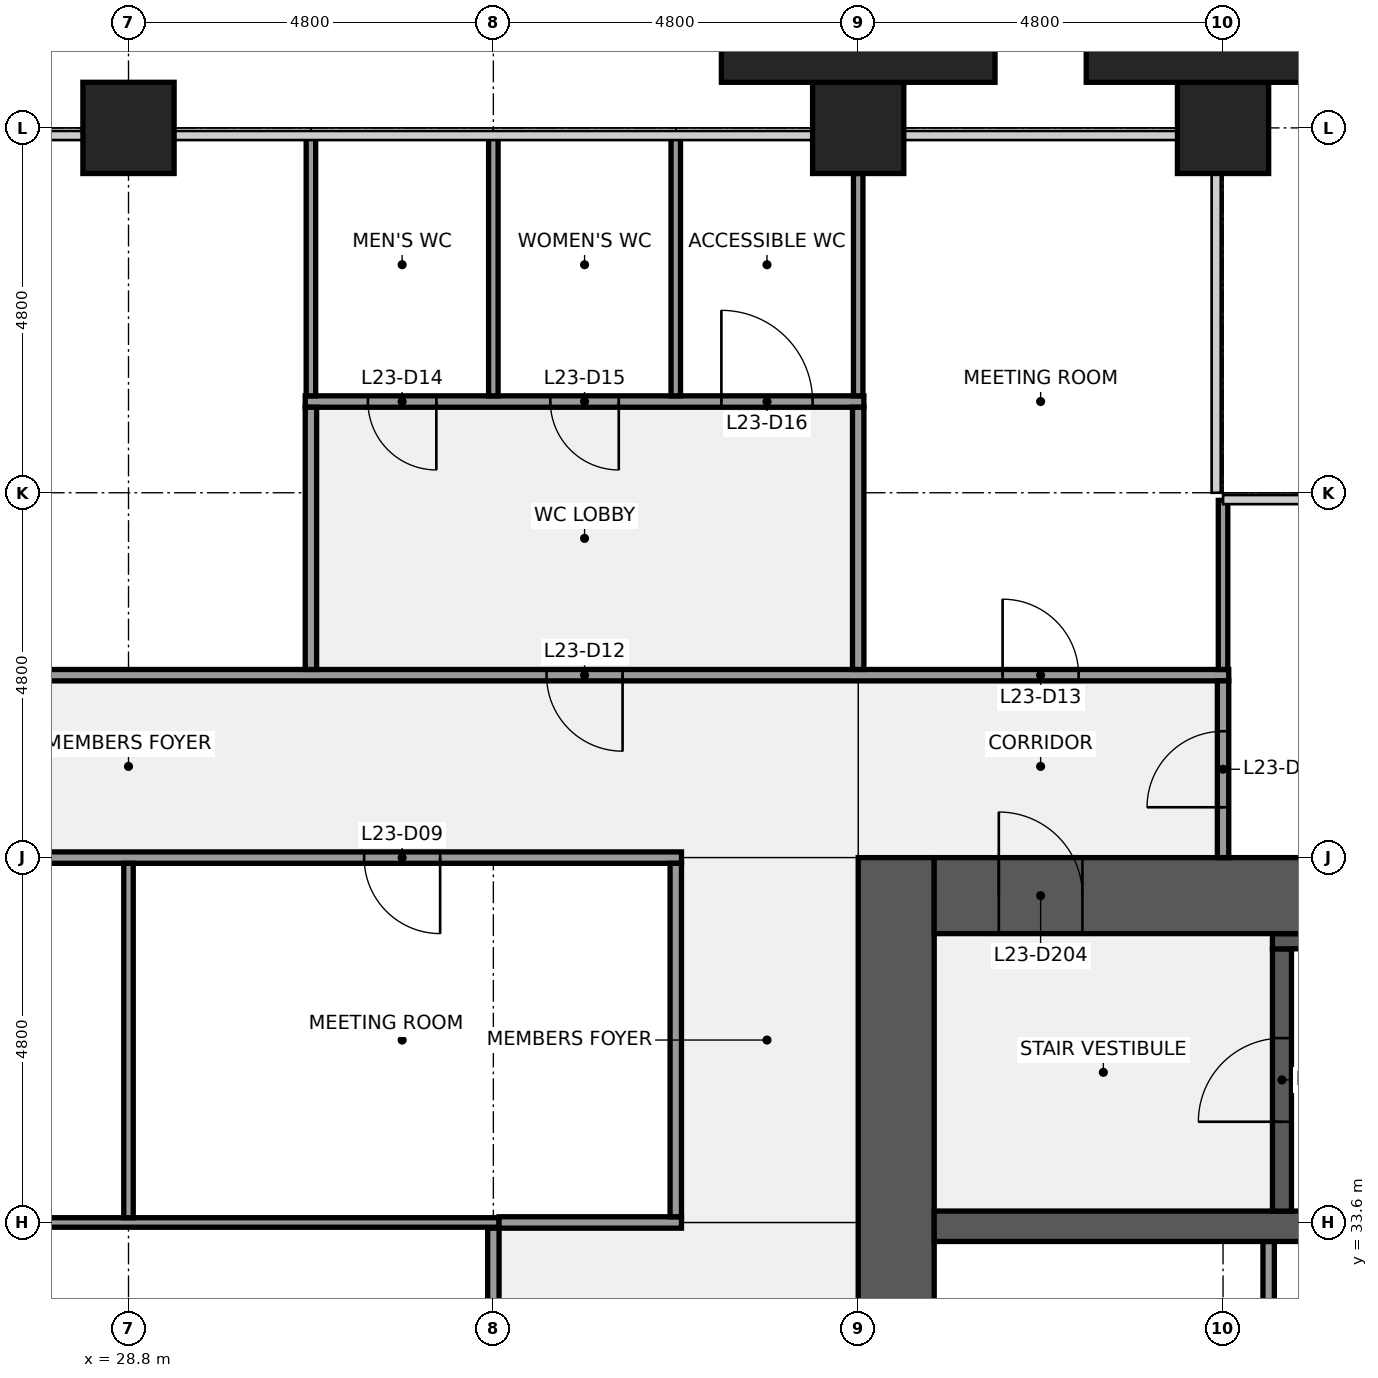
"""IFC4 building model, lengths in metres.
Left out: names, types, materials, properties, quantities, classifications, styles, units other than length and angle.
Written with IfcOpenShell. Run it as: python <this file> out.ifc"""

import sys

from ifc_helpers import new_model, si_unit, direction, frame, frame_2d, origin, origin_2d, place, context, subcontext, project, spatial, rectangle, extrude, element, fill, save


model = new_model("IFC4")
c1 = context("Model", 3, precision=1e-05, world=origin(), true_north=direction((0.0, 1.0)))
c2 = subcontext(c1, "Body", "Model", "MODEL_VIEW")
j1 = project(units=[si_unit("LENGTHUNIT", "METRE"), si_unit("PLANEANGLEUNIT", "RADIAN")], contexts=[c1])
p1 = place(None, origin())
s1 = spatial("IfcSite", under=j1, at=p1, CompositionType="ELEMENT")
p2 = place(p1, origin())
s2 = spatial("IfcBuilding", under=s1, at=p2, CompositionType="ELEMENT")
p3 = place(p2, frame((0.0, 0.0, 112.1)))
s3 = spatial("IfcBuildingStorey", under=s2, at=p3, CompositionType="ELEMENT", Elevation=112.1)
for number, where, z_axis, x_axis in (
    (1, (28.8, 48.0, 0.0), (0.0, 0.0, 1.0), (1.0, 0.0, 0.0)),
    (2, (38.4, 48.0, 0.0), (0.0, 0.0, 1.0), (1.0, 0.0, 0.0)),
    (3, (43.2, 48.0, 0.0), (0.0, 0.0, 1.0), (1.0, 0.0, 0.0)),
):
    element("IfcColumn", number, at=place(p3, frame(where, z_axis=z_axis, x_axis=x_axis)), inside=s3, PredefinedType="COLUMN", context=c2, shape_type="SweptSolid", body=[
        extrude(rectangle(XDim=1.2, YDim=1.2, at=origin_2d()), origin(), (0.0, 0.0, 1.0), 4.0),
    ])
p4 = place(p3, frame((38.9, 9.6, 0.0), z_axis=(0.0, 0.0, 1.0), x_axis=(0.0, 1.0, 0.0)))
e4 = element("IfcWall", 4, at=p4, inside=s3, PredefinedType="SHEAR", context=c2, shape_type="SweptSolid", body=[
    extrude(rectangle(XDim=28.8, YDim=1.0, at=frame_2d((14.4, 0.0))), origin(), (0.0, 0.0, 1.0), 3.84),
])
p5 = place(p4, frame((8.7, 0.0, 0.0)))
e5 = element("IfcOpeningElement", 5, at=p5, cuts=e4, PredefinedType="OPENING", context=c2, shape_type="SweptSolid", body=[
    extrude(rectangle(XDim=1.8, YDim=2.1, at=frame_2d((0.9, 1.05))), frame((0.0, 0.51, 0.0), z_axis=(0.0, -1.0, 0.0), x_axis=(1.0, 0.0, 0.0)), (0.0, 0.0, 1.0), 1.02),
])
p6 = place(p4, frame((18.3, 0.0, 0.0)))
e6 = element("IfcOpeningElement", 6, at=p6, cuts=e4, PredefinedType="OPENING", context=c2, shape_type="SweptSolid", body=[
    extrude(rectangle(XDim=1.8, YDim=2.1, at=frame_2d((0.9, 1.05))), frame((0.0, 0.51, 0.0), z_axis=(0.0, -1.0, 0.0), x_axis=(1.0, 0.0, 0.0)), (0.0, 0.0, 1.0), 1.02),
])
p7 = place(p3, frame((43.8, 30.75, 0.0), z_axis=(0.0, 0.0, 1.0), x_axis=(0.0, 1.0, 0.0)))
e7 = element("IfcWall", 7, at=p7, inside=s3, PredefinedType="PARTITIONING", context=c2, shape_type="SweptSolid", body=[
    extrude(rectangle(XDim=2.6, YDim=0.15, at=frame_2d((1.3, 0.0))), origin(), (0.0, 0.0, 1.0), 3.84),
])
p8 = place(p3, frame((39.4, 33.55, 0.0), z_axis=(0.0, 0.0, 1.0), x_axis=(1.0, 0.0, 0.0)))
e8 = element("IfcWall", 8, at=p8, inside=s3, PredefinedType="SHEAR", context=c2, shape_type="SweptSolid", body=[
    extrude(rectangle(XDim=17.2, YDim=0.4, at=frame_2d((8.6, 0.0))), origin(), (0.0, 0.0, 1.0), 3.84),
])
p9 = place(p3, frame((43.975, 33.75, 0.0), z_axis=(0.0, 0.0, 1.0), x_axis=(0.0, 1.0, 0.0)))
e9 = element("IfcWall", 9, at=p9, inside=s3, PredefinedType="SHEAR", context=c2, shape_type="SweptSolid", body=[
    extrude(rectangle(XDim=3.45, YDim=0.25, at=frame_2d((1.725, 0.0))), origin(), (0.0, 0.0, 1.0), 3.84),
])
p10 = place(p9, frame((1.175, 0.0, 0.0)))
e10 = element("IfcOpeningElement", 10, at=p10, cuts=e9, PredefinedType="OPENING", context=c2, shape_type="SweptSolid", body=[
    extrude(rectangle(XDim=1.1, YDim=2.1, at=frame_2d((0.55, 1.05))), frame((0.0, 0.135, 0.0), z_axis=(0.0, -1.0, 0.0), x_axis=(1.0, 0.0, 0.0)), (0.0, 0.0, 1.0), 0.27),
])
p11 = place(p3, frame((43.85, 37.3, 0.0), z_axis=(0.0, 0.0, 1.0), x_axis=(1.0, 0.0, 0.0)))
e11 = element("IfcWall", 11, at=p11, inside=s3, PredefinedType="SHEAR", context=c2, shape_type="SweptSolid", body=[
    extrude(rectangle(XDim=7.5, YDim=0.2, at=frame_2d((3.75, 0.0))), origin(), (0.0, 0.0, 1.0), 3.84),
])
p12 = place(p3, frame((39.4, 37.9, 0.0), z_axis=(0.0, 0.0, 1.0), x_axis=(1.0, 0.0, 0.0)))
e12 = element("IfcWall", 12, at=p12, inside=s3, PredefinedType="SHEAR", context=c2, shape_type="SweptSolid", body=[
    extrude(rectangle(XDim=13.4, YDim=1.0, at=frame_2d((6.7, 0.0))), origin(), (0.0, 0.0, 1.0), 3.84),
])
p13 = place(p12, frame((0.85, 0.0, 0.0)))
e13 = element("IfcOpeningElement", 13, at=p13, cuts=e12, PredefinedType="OPENING", context=c2, shape_type="SweptSolid", body=[
    extrude(rectangle(XDim=1.1, YDim=2.1, at=frame_2d((0.55, 1.05))), frame((0.0, 0.51, 0.0), z_axis=(0.0, -1.0, 0.0), x_axis=(1.0, 0.0, 0.0)), (0.0, 0.0, 1.0), 1.02),
])
p14 = place(p3, frame((24.075, 33.6, 0.0), z_axis=(0.0, 0.0, 1.0), x_axis=(1.0, 0.0, 0.0)))
e14 = element("IfcWall", 14, at=p14, inside=s3, PredefinedType="PARTITIONING", context=c2, shape_type="SweptSolid", body=[
    extrude(rectangle(XDim=9.6, YDim=0.125, at=frame_2d((4.8, 0.0))), origin(), (0.0, 0.0, 1.0), 2.849),
])
p15 = place(p3, frame((33.675, 33.6, 0.0), z_axis=(0.0, 0.0, 1.0), x_axis=(1.0, 0.0, 0.0)))
e15 = element("IfcWall", 15, at=p15, inside=s3, PredefinedType="PARTITIONING", context=c2, shape_type="SweptSolid", body=[
    extrude(rectangle(XDim=2.4, YDim=0.15, at=frame_2d((1.2, 0.0))), origin(), (0.0, 0.0, 1.0), 2.849),
])
p16 = place(p3, frame((21.525, 38.4, 0.0), z_axis=(0.0, 0.0, 1.0), x_axis=(1.0, 0.0, 0.0)))
e16 = element("IfcWall", 16, at=p16, inside=s3, PredefinedType="PARTITIONING", context=c2, shape_type="SweptSolid", body=[
    extrude(rectangle(XDim=14.55, YDim=0.15, at=frame_2d((7.275, 0.0))), origin(), (0.0, 0.0, 1.0), 2.849),
])
p17 = place(p16, frame((3.175, 0.0, 0.0)))
e17 = element("IfcOpeningElement", 17, at=p17, cuts=e16, PredefinedType="OPENING", context=c2, shape_type="SweptSolid", body=[
    extrude(rectangle(XDim=1.0, YDim=2.1, at=frame_2d((0.5, 1.05))), frame((0.0, 0.085, 0.0), z_axis=(0.0, -1.0, 0.0), x_axis=(1.0, 0.0, 0.0)), (0.0, 0.0, 1.0), 0.17),
])
p18 = place(p16, frame((10.375, 0.0, 0.0)))
e18 = element("IfcOpeningElement", 18, at=p18, cuts=e16, PredefinedType="OPENING", context=c2, shape_type="SweptSolid", body=[
    extrude(rectangle(XDim=1.0, YDim=2.1, at=frame_2d((0.5, 1.05))), frame((0.0, 0.085, 0.0), z_axis=(0.0, -1.0, 0.0), x_axis=(1.0, 0.0, 0.0)), (0.0, 0.0, 1.0), 0.17),
])
p19 = place(p3, frame((14.325, 40.8, 0.0), z_axis=(0.0, 0.0, 1.0), x_axis=(1.0, 0.0, 0.0)))
e19 = element("IfcWall", 19, at=p19, inside=s3, PredefinedType="PARTITIONING", context=c2, shape_type="SweptSolid", body=[
    extrude(rectangle(XDim=28.95, YDim=0.15, at=frame_2d((14.475, 0.0))), origin(), (0.0, 0.0, 1.0), 2.849),
])
p20 = place(p19, frame((1.975, 0.0, 0.0)))
e20 = element("IfcOpeningElement", 20, at=p20, cuts=e19, PredefinedType="OPENING", context=c2, shape_type="SweptSolid", body=[
    extrude(rectangle(XDim=1.0, YDim=2.1, at=frame_2d((0.5, 1.05))), frame((0.0, 0.085, 0.0), z_axis=(0.0, -1.0, 0.0), x_axis=(1.0, 0.0, 0.0)), (0.0, 0.0, 1.0), 0.17),
])
p21 = place(p19, frame((10.375, 0.0, 0.0)))
e21 = element("IfcOpeningElement", 21, at=p21, cuts=e19, PredefinedType="OPENING", context=c2, shape_type="SweptSolid", body=[
    extrude(rectangle(XDim=1.0, YDim=2.1, at=frame_2d((0.5, 1.05))), frame((0.0, 0.085, 0.0), z_axis=(0.0, -1.0, 0.0), x_axis=(1.0, 0.0, 0.0)), (0.0, 0.0, 1.0), 0.17),
])
p22 = place(p19, frame((19.975, 0.0, 0.0)))
e22 = element("IfcOpeningElement", 22, at=p22, cuts=e19, PredefinedType="OPENING", context=c2, shape_type="SweptSolid", body=[
    extrude(rectangle(XDim=1.0, YDim=2.1, at=frame_2d((0.5, 1.05))), frame((0.0, 0.085, 0.0), z_axis=(0.0, -1.0, 0.0), x_axis=(1.0, 0.0, 0.0)), (0.0, 0.0, 1.0), 0.17),
])
p23 = place(p19, frame((25.975, 0.0, 0.0)))
e23 = element("IfcOpeningElement", 23, at=p23, cuts=e19, PredefinedType="OPENING", context=c2, shape_type="SweptSolid", body=[
    extrude(rectangle(XDim=1.0, YDim=2.1, at=frame_2d((0.5, 1.05))), frame((0.0, 0.085, 0.0), z_axis=(0.0, -1.0, 0.0), x_axis=(1.0, 0.0, 0.0)), (0.0, 0.0, 1.0), 0.17),
])
p24 = place(p3, frame((31.125, 44.4, 0.0), z_axis=(0.0, 0.0, 1.0), x_axis=(1.0, 0.0, 0.0)))
e24 = element("IfcWall", 24, at=p24, inside=s3, PredefinedType="PARTITIONING", context=c2, shape_type="SweptSolid", body=[
    extrude(rectangle(XDim=7.35, YDim=0.15, at=frame_2d((3.675, 0.0))), origin(), (0.0, 0.0, 1.0), 2.849),
])
p25 = place(p24, frame((0.825, 0.0, 0.0)))
e25 = element("IfcOpeningElement", 25, at=p25, cuts=e24, PredefinedType="OPENING", context=c2, shape_type="SweptSolid", body=[
    extrude(rectangle(XDim=0.9, YDim=2.1, at=frame_2d((0.45, 1.05))), frame((0.0, 0.085, 0.0), z_axis=(0.0, -1.0, 0.0), x_axis=(1.0, 0.0, 0.0)), (0.0, 0.0, 1.0), 0.17),
])
p26 = place(p24, frame((3.225, 0.0, 0.0)))
e26 = element("IfcOpeningElement", 26, at=p26, cuts=e24, PredefinedType="OPENING", context=c2, shape_type="SweptSolid", body=[
    extrude(rectangle(XDim=0.9, YDim=2.1, at=frame_2d((0.45, 1.05))), frame((0.0, 0.085, 0.0), z_axis=(0.0, -1.0, 0.0), x_axis=(1.0, 0.0, 0.0)), (0.0, 0.0, 1.0), 0.17),
])
p27 = place(p24, frame((5.475, 0.0, 0.0)))
e27 = element("IfcOpeningElement", 27, at=p27, cuts=e24, PredefinedType="OPENING", context=c2, shape_type="SweptSolid", body=[
    extrude(rectangle(XDim=1.2, YDim=2.1, at=frame_2d((0.6, 1.05))), frame((0.0, 0.085, 0.0), z_axis=(0.0, -1.0, 0.0), x_axis=(1.0, 0.0, 0.0)), (0.0, 0.0, 1.0), 0.17),
])
p28 = place(p3, frame((28.8, 33.663, 0.0), z_axis=(0.0, 0.0, 1.0), x_axis=(0.0, 1.0, 0.0)))
e28 = element("IfcWall", 28, at=p28, inside=s3, PredefinedType="PARTITIONING", context=c2, shape_type="SweptSolid", body=[
    extrude(rectangle(XDim=4.662, YDim=0.125, at=frame_2d((2.331, 0.0))), origin(), (0.0, 0.0, 1.0), 2.849),
])
p29 = place(p3, frame((31.2, 44.475, 0.0), z_axis=(0.0, 0.0, 1.0), x_axis=(0.0, 1.0, 0.0)))
e29 = element("IfcWall", 29, at=p29, inside=s3, PredefinedType="PARTITIONING", context=c2, shape_type="SweptSolid", body=[
    extrude(rectangle(XDim=3.425, YDim=0.125, at=frame_2d((1.712, 0.0))), origin(), (0.0, 0.0, 1.0), 2.849),
])
p30 = place(p3, frame((31.2, 40.875, 0.0), z_axis=(0.0, 0.0, 1.0), x_axis=(0.0, 1.0, 0.0)))
e30 = element("IfcWall", 30, at=p30, inside=s3, PredefinedType="PARTITIONING", context=c2, shape_type="SweptSolid", body=[
    extrude(rectangle(XDim=3.45, YDim=0.15, at=frame_2d((1.725, 0.0))), origin(), (0.0, 0.0, 1.0), 2.849),
])
p31 = place(p3, frame((33.6, 44.475, 0.0), z_axis=(0.0, 0.0, 1.0), x_axis=(0.0, 1.0, 0.0)))
e31 = element("IfcWall", 31, at=p31, inside=s3, PredefinedType="PARTITIONING", context=c2, shape_type="SweptSolid", body=[
    extrude(rectangle(XDim=3.425, YDim=0.125, at=frame_2d((1.712, 0.0))), origin(), (0.0, 0.0, 1.0), 2.849),
])
p32 = place(p3, frame((33.6, 20.475, 0.0), z_axis=(0.0, 0.0, 1.0), x_axis=(0.0, 1.0, 0.0)))
e32 = element("IfcWall", 32, at=p32, inside=s3, PredefinedType="PARTITIONING", context=c2, shape_type="SweptSolid", body=[
    extrude(rectangle(XDim=13.05, YDim=0.15, at=frame_2d((6.525, 0.0))), origin(), (0.0, 0.0, 1.0), 2.849),
])
p33 = place(p3, frame((36.0, 44.475, 0.0), z_axis=(0.0, 0.0, 1.0), x_axis=(0.0, 1.0, 0.0)))
e33 = element("IfcWall", 33, at=p33, inside=s3, PredefinedType="PARTITIONING", context=c2, shape_type="SweptSolid", body=[
    extrude(rectangle(XDim=3.425, YDim=0.125, at=frame_2d((1.712, 0.0))), origin(), (0.0, 0.0, 1.0), 2.849),
])
p34 = place(p3, frame((36.0, 33.675, 0.0), z_axis=(0.0, 0.0, 1.0), x_axis=(0.0, 1.0, 0.0)))
e34 = element("IfcWall", 34, at=p34, inside=s3, PredefinedType="PARTITIONING", context=c2, shape_type="SweptSolid", body=[
    extrude(rectangle(XDim=4.65, YDim=0.15, at=frame_2d((2.325, 0.0))), origin(), (0.0, 0.0, 1.0), 2.849),
])
p35 = place(p3, frame((38.4, 44.475, 0.0), z_axis=(0.0, 0.0, 1.0), x_axis=(0.0, 1.0, 0.0)))
e35 = element("IfcWall", 35, at=p35, inside=s3, PredefinedType="PARTITIONING", context=c2, shape_type="SweptSolid", body=[
    extrude(rectangle(XDim=2.925, YDim=0.125, at=frame_2d((1.462, 0.0))), origin(), (0.0, 0.0, 1.0), 2.849),
])
p36 = place(p3, frame((38.4, 40.875, 0.0), z_axis=(0.0, 0.0, 1.0), x_axis=(0.0, 1.0, 0.0)))
e36 = element("IfcWall", 36, at=p36, inside=s3, PredefinedType="PARTITIONING", context=c2, shape_type="SweptSolid", body=[
    extrude(rectangle(XDim=3.45, YDim=0.15, at=frame_2d((1.725, 0.0))), origin(), (0.0, 0.0, 1.0), 2.849),
])
p37 = place(p3, frame((43.2, 40.875, 0.0), z_axis=(0.0, 0.0, 1.0), x_axis=(0.0, 1.0, 0.0)))
e37 = element("IfcWall", 37, at=p37, inside=s3, PredefinedType="PARTITIONING", context=c2, shape_type="SweptSolid", body=[
    extrude(rectangle(XDim=2.225, YDim=0.125, at=frame_2d((1.113, 0.0))), origin(), (0.0, 0.0, 1.0), 2.849),
])
p38 = place(p3, frame((43.2, 38.4, 0.0), z_axis=(0.0, 0.0, 1.0), x_axis=(0.0, 1.0, 0.0)))
e38 = element("IfcWall", 38, at=p38, inside=s3, PredefinedType="PARTITIONING", context=c2, shape_type="SweptSolid", body=[
    extrude(rectangle(XDim=2.325, YDim=0.15, at=frame_2d((1.163, 0.0))), origin(), (0.0, 0.0, 1.0), 2.849),
])
p39 = place(p38, frame((0.663, 0.0, 0.0)))
e39 = element("IfcOpeningElement", 39, at=p39, cuts=e38, PredefinedType="OPENING", context=c2, shape_type="SweptSolid", body=[
    extrude(rectangle(XDim=1.0, YDim=2.1, at=frame_2d((0.5, 1.05))), frame((0.0, 0.085, 0.0), z_axis=(0.0, -1.0, 0.0), x_axis=(1.0, 0.0, 0.0)), (0.0, 0.0, 1.0), 0.17),
])
for number, where, z_axis, x_axis in (
    (40, (38.4, 49.05, 0.0), (0.0, 0.0, 1.0), (1.0, 0.0, 0.0)),
    (41, (43.2, 49.05, 0.0), (0.0, 0.0, 1.0), (1.0, 0.0, 0.0)),
):
    element("IfcColumn", number, at=place(p3, frame(where, z_axis=z_axis, x_axis=x_axis)), inside=s3, PredefinedType="PILASTER", context=c2, shape_type="SweptSolid", body=[
        extrude(rectangle(XDim=3.6, YDim=0.9, at=origin_2d()), origin(), (0.0, 0.0, 1.0), 4.0),
    ])
p40 = place(p10, origin())
e42 = element("IfcDoor", 42, at=p40, inside=s3, OperationType="SINGLE_SWING_LEFT", PredefinedType="DOOR", context=c2, shape_type="SweptSolid", body=[
    extrude(rectangle(XDim=1.1, YDim=2.1, at=frame_2d((0.55, 1.05))), frame((0.0, 0.025, 0.0), z_axis=(0.0, -1.0, 0.0), x_axis=(1.0, 0.0, 0.0)), (0.0, 0.0, 1.0), 0.05),
])
fill(e10, e42)
p41 = place(p13, origin())
e43 = element("IfcDoor", 43, at=p41, inside=s3, OperationType="SINGLE_SWING_LEFT", PredefinedType="DOOR", context=c2, shape_type="SweptSolid", body=[
    extrude(rectangle(XDim=1.1, YDim=2.1, at=frame_2d((0.55, 1.05))), frame((0.0, 0.025, 0.0), z_axis=(0.0, -1.0, 0.0), x_axis=(1.0, 0.0, 0.0)), (0.0, 0.0, 1.0), 0.05),
])
fill(e13, e43)
p42 = place(p18, origin())
e44 = element("IfcDoor", 44, at=p42, inside=s3, OperationType="SINGLE_SWING_RIGHT", PredefinedType="DOOR", context=c2, shape_type="SweptSolid", body=[
    extrude(rectangle(XDim=1.0, YDim=2.1, at=frame_2d((0.5, 1.05))), frame((0.0, 0.025, 0.0), z_axis=(0.0, -1.0, 0.0), x_axis=(1.0, 0.0, 0.0)), (0.0, 0.0, 1.0), 0.05),
])
fill(e18, e44)
p43 = place(p22, origin())
e45 = element("IfcDoor", 45, at=p43, inside=s3, OperationType="SINGLE_SWING_RIGHT", PredefinedType="DOOR", context=c2, shape_type="SweptSolid", body=[
    extrude(rectangle(XDim=1.0, YDim=2.1, at=frame_2d((0.5, 1.05))), frame((0.0, 0.025, 0.0), z_axis=(0.0, -1.0, 0.0), x_axis=(1.0, 0.0, 0.0)), (0.0, 0.0, 1.0), 0.05),
])
fill(e22, e45)
p44 = place(p23, origin())
e46 = element("IfcDoor", 46, at=p44, inside=s3, OperationType="SINGLE_SWING_LEFT", PredefinedType="DOOR", context=c2, shape_type="SweptSolid", body=[
    extrude(rectangle(XDim=1.0, YDim=2.1, at=frame_2d((0.5, 1.05))), frame((0.0, 0.025, 0.0), z_axis=(0.0, -1.0, 0.0), x_axis=(1.0, 0.0, 0.0)), (0.0, 0.0, 1.0), 0.05),
])
fill(e23, e46)
p45 = place(p25, origin())
e47 = element("IfcDoor", 47, at=p45, inside=s3, OperationType="SINGLE_SWING_RIGHT", PredefinedType="DOOR", context=c2, shape_type="SweptSolid", body=[
    extrude(rectangle(XDim=0.9, YDim=2.1, at=frame_2d((0.45, 1.05))), frame((0.0, 0.025, 0.0), z_axis=(0.0, -1.0, 0.0), x_axis=(1.0, 0.0, 0.0)), (0.0, 0.0, 1.0), 0.05),
])
fill(e25, e47)
p46 = place(p26, origin())
e48 = element("IfcDoor", 48, at=p46, inside=s3, OperationType="SINGLE_SWING_RIGHT", PredefinedType="DOOR", context=c2, shape_type="SweptSolid", body=[
    extrude(rectangle(XDim=0.9, YDim=2.1, at=frame_2d((0.45, 1.05))), frame((0.0, 0.025, 0.0), z_axis=(0.0, -1.0, 0.0), x_axis=(1.0, 0.0, 0.0)), (0.0, 0.0, 1.0), 0.05),
])
fill(e26, e48)
p47 = place(p27, origin())
e49 = element("IfcDoor", 49, at=p47, inside=s3, OperationType="SINGLE_SWING_LEFT", PredefinedType="DOOR", context=c2, shape_type="SweptSolid", body=[
    extrude(rectangle(XDim=1.2, YDim=2.1, at=frame_2d((0.6, 1.05))), frame((0.0, 0.025, 0.0), z_axis=(0.0, -1.0, 0.0), x_axis=(1.0, 0.0, 0.0)), (0.0, 0.0, 1.0), 0.05),
])
fill(e27, e49)
p48 = place(p39, origin())
e50 = element("IfcDoor", 50, at=p48, inside=s3, OperationType="SINGLE_SWING_LEFT", PredefinedType="DOOR", context=c2, shape_type="SweptSolid", body=[
    extrude(rectangle(XDim=1.0, YDim=2.1, at=frame_2d((0.5, 1.05))), frame((0.0, 0.025, 0.0), z_axis=(0.0, -1.0, 0.0), x_axis=(1.0, 0.0, 0.0)), (0.0, 0.0, 1.0), 0.05),
])
fill(e39, e50)
save(model, sys.argv[1])
